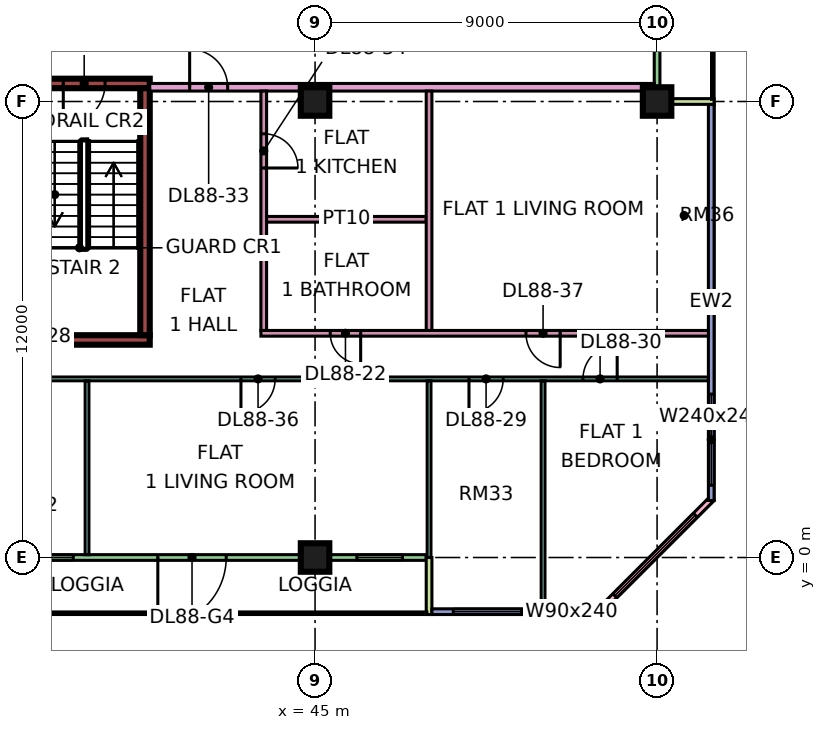
"""IFC4 building model, lengths in metres.
Left out: names, types, materials, properties, quantities, classifications, styles, units other than length and angle.
Written with IfcOpenShell. Run it as: python <this file> out.ifc"""

import sys

from ifc_helpers import new_model, si_unit, direction, frame, frame_2d, origin, origin_2d, place, context, subcontext, project, spatial, rectangle, extrude, element, fill, save


model = new_model("IFC4")
c1 = context("Model", 3, precision=1e-05, world=origin(), true_north=direction((0.0, 1.0)))
c2 = subcontext(c1, "Body", "Model", "MODEL_VIEW")
j1 = project(units=[si_unit("LENGTHUNIT", "METRE"), si_unit("PLANEANGLEUNIT", "RADIAN")], contexts=[c1])
p1 = place(None, origin())
s1 = spatial("IfcSite", under=j1, at=p1, CompositionType="ELEMENT")
p2 = place(p1, origin())
s2 = spatial("IfcBuilding", under=s1, at=p2, CompositionType="ELEMENT")
p3 = place(p2, frame((0.0, 0.0, 376.4)))
s3 = spatial("IfcBuildingStorey", under=s2, at=p3, CompositionType="ELEMENT", Elevation=376.4)
for number, where, z_axis, x_axis in (
    (1, (45.0, 0.0, 0.0), (0.0, 0.0, 1.0), (1.0, 0.0, 0.0)),
    (2, (45.0, 12.0, 0.0), (0.0, 0.0, 1.0), (1.0, 0.0, 0.0)),
    (3, (54.0, 12.0, 0.0), (0.0, 0.0, 1.0), (1.0, 0.0, 0.0)),
):
    element("IfcColumn", number, at=place(p3, frame(where, z_axis=z_axis, x_axis=x_axis)), inside=s3, PredefinedType="COLUMN", context=c2, shape_type="SweptSolid", body=[
        extrude(rectangle(XDim=0.75, YDim=0.75, at=origin_2d()), origin(), (0.0, 0.0, 1.0), 3.75),
    ])
p4 = place(p3, frame((37.2, 5.725, 0.0), z_axis=(0.0, 0.0, 1.0), x_axis=(1.0, 0.0, 0.0)))
e4 = element("IfcWall", 4, at=p4, inside=s3, PredefinedType="SHEAR", context=c2, shape_type="SweptSolid", body=[
    extrude(rectangle(XDim=3.45, YDim=0.25, at=frame_2d((1.725, 0.0))), origin(), (0.0, 0.0, 1.0), 3.75),
])
p5 = place(p3, frame((36.375, 12.475, 0.0), z_axis=(0.0, 0.0, 1.0), x_axis=(1.0, 0.0, 0.0)))
e5 = element("IfcWall", 5, at=p5, inside=s3, PredefinedType="SHEAR", context=c2, shape_type="SweptSolid", body=[
    extrude(rectangle(XDim=4.275, YDim=0.25, at=frame_2d((2.137, 0.0))), origin(), (0.0, 0.0, 1.0), 3.75),
])
p6 = place(p5, frame((2.0, 0.0, 0.0)))
e6 = element("IfcOpeningElement", 6, at=p6, cuts=e5, PredefinedType="OPENING", context=c2, shape_type="SweptSolid", body=[
    extrude(rectangle(XDim=1.1, YDim=2.2, at=frame_2d((0.55, 1.1))), frame((0.0, 0.135, 0.0), z_axis=(0.0, -1.0, 0.0), x_axis=(1.0, 0.0, 0.0)), (0.0, 0.0, 1.0), 0.27),
])
p7 = place(p3, frame((40.525, 5.85, 0.0), z_axis=(0.0, 0.0, 1.0), x_axis=(0.0, 1.0, 0.0)))
e7 = element("IfcWall", 7, at=p7, inside=s3, PredefinedType="SHEAR", context=c2, shape_type="SweptSolid", body=[
    extrude(rectangle(XDim=6.5, YDim=0.25, at=frame_2d((3.25, 0.0))), origin(), (0.0, 0.0, 1.0), 3.75),
])
p8 = place(p3, frame((36.075, 0.0, 0.0), z_axis=(0.0, 0.0, 1.0), x_axis=(1.0, 0.0, 0.0)))
e8 = element("IfcWall", 8, at=p8, inside=s3, PredefinedType="SOLIDWALL", context=c2, shape_type="SweptSolid", body=[
    extrude(rectangle(XDim=11.85, YDim=0.15, at=frame_2d((5.925, 0.0))), origin(), (0.0, 0.0, 1.0), 3.35),
])
p9 = place(p8, frame((0.762, 0.0, 0.45)))
e9 = element("IfcOpeningElement", 9, at=p9, cuts=e8, PredefinedType="OPENING", context=c2, shape_type="SweptSolid", body=[
    extrude(rectangle(XDim=1.8, YDim=2.4, at=frame_2d((0.9, 1.2))), frame((0.0, 0.085, 0.0), z_axis=(0.0, -1.0, 0.0), x_axis=(1.0, 0.0, 0.0)), (0.0, 0.0, 1.0), 0.17),
])
p10 = place(p8, frame((4.788, 0.0, 0.0)))
e10 = element("IfcOpeningElement", 10, at=p10, cuts=e8, PredefinedType="OPENING", context=c2, shape_type="SweptSolid", body=[
    extrude(rectangle(XDim=1.8, YDim=2.4, at=frame_2d((0.9, 1.2))), frame((0.0, 0.085, 0.0), z_axis=(0.0, -1.0, 0.0), x_axis=(1.0, 0.0, 0.0)), (0.0, 0.0, 1.0), 0.17),
])
p11 = place(p8, frame((10.025, 0.0, 0.45)))
e11 = element("IfcOpeningElement", 11, at=p11, cuts=e8, PredefinedType="OPENING", context=c2, shape_type="SweptSolid", body=[
    extrude(rectangle(XDim=1.2, YDim=2.4, at=frame_2d((0.6, 1.2))), frame((0.0, 0.085, 0.0), z_axis=(0.0, -1.0, 0.0), x_axis=(1.0, 0.0, 0.0)), (0.0, 0.0, 1.0), 0.17),
])
p12 = place(p3, frame((48.0, -1.5, 0.0), z_axis=(0.0, 0.0, 1.0), x_axis=(0.0, 1.0, 0.0)))
e12 = element("IfcWall", 12, at=p12, inside=s3, PredefinedType="SOLIDWALL", context=c2, shape_type="SweptSolid", body=[
    extrude(rectangle(XDim=1.5, YDim=0.15, at=frame_2d((0.75, 0.0))), origin(), (0.0, 0.0, 1.0), 3.35),
])
p13 = place(p3, frame((48.075, -1.425, 0.0), z_axis=(0.0, 0.0, 1.0), x_axis=(1.0, 0.0, 0.0)))
e13 = element("IfcWall", 13, at=p13, inside=s3, PredefinedType="SOLIDWALL", context=c2, shape_type="SweptSolid", body=[
    extrude(rectangle(XDim=4.425, YDim=0.15, at=frame_2d((2.212, 0.0))), origin(), (0.0, 0.0, 1.0), 3.35),
])
p14 = place(p13, frame((0.562, 0.0, 0.45)))
e14 = element("IfcOpeningElement", 14, at=p14, cuts=e13, PredefinedType="OPENING", context=c2, shape_type="SweptSolid", body=[
    extrude(rectangle(XDim=1.8, YDim=2.4, at=frame_2d((0.9, 1.2))), frame((0.0, 0.085, 0.0), z_axis=(0.0, -1.0, 0.0), x_axis=(1.0, 0.0, 0.0)), (0.0, 0.0, 1.0), 0.17),
])
p15 = place(p13, frame((3.225, 0.0, 0.45)))
e15 = element("IfcOpeningElement", 15, at=p15, cuts=e13, PredefinedType="OPENING", context=c2, shape_type="SweptSolid", body=[
    extrude(rectangle(XDim=0.9, YDim=2.4, at=frame_2d((0.45, 1.2))), frame((0.0, 0.085, 0.0), z_axis=(0.0, -1.0, 0.0), x_axis=(1.0, 0.0, 0.0)), (0.0, 0.0, 1.0), 0.17),
])
p16 = place(p3, frame((52.447, -1.447, 0.0), z_axis=(0.0, 0.0, 1.0), x_axis=(0.707106781187, 0.707106781187, 0.0)))
e16 = element("IfcWall", 16, at=p16, inside=s3, PredefinedType="SOLIDWALL", context=c2, shape_type="SweptSolid", body=[
    extrude(rectangle(XDim=4.243, YDim=0.15, at=frame_2d((2.121, 0.0))), origin(), (0.0, 0.0, 1.0), 3.35),
])
p17 = place(p16, frame((0.621, 0.0, 0.45)))
e17 = element("IfcOpeningElement", 17, at=p17, cuts=e16, PredefinedType="OPENING", context=c2, shape_type="SweptSolid", body=[
    extrude(rectangle(XDim=3.0, YDim=2.4, at=frame_2d((1.5, 1.2))), frame((0.0, 0.085, 0.0), z_axis=(0.0, -1.0, 0.0), x_axis=(1.0, 0.0, 0.0)), (0.0, 0.0, 1.0), 0.17),
])
p18 = place(p3, frame((55.425, 1.5, 0.0), z_axis=(0.0, 0.0, 1.0), x_axis=(0.0, 1.0, 0.0)))
e18 = element("IfcWall", 18, at=p18, inside=s3, PredefinedType="SOLIDWALL", context=c2, shape_type="SweptSolid", body=[
    extrude(rectangle(XDim=10.425, YDim=0.15, at=frame_2d((5.212, 0.0))), origin(), (0.0, 0.0, 1.0), 3.35),
])
p19 = place(p18, frame((0.4, 0.0, 0.45)))
e19 = element("IfcOpeningElement", 19, at=p19, cuts=e18, PredefinedType="OPENING", context=c2, shape_type="SweptSolid", body=[
    extrude(rectangle(XDim=2.4, YDim=2.4, at=frame_2d((1.2, 1.2))), frame((0.0, 0.085, 0.0), z_axis=(0.0, -1.0, 0.0), x_axis=(1.0, 0.0, 0.0)), (0.0, 0.0, 1.0), 0.17),
])
p20 = place(p3, frame((54.0, 12.075, 0.0), z_axis=(0.0, 0.0, 1.0), x_axis=(0.0, 1.0, 0.0)))
e20 = element("IfcWall", 20, at=p20, inside=s3, PredefinedType="SOLIDWALL", context=c2, shape_type="SweptSolid", body=[
    extrude(rectangle(XDim=10.35, YDim=0.15, at=frame_2d((5.175, 0.0))), origin(), (0.0, 0.0, 1.0), 3.35),
])
p21 = place(p20, frame((4.538, 0.0, 0.45)))
e21 = element("IfcOpeningElement", 21, at=p21, cuts=e20, PredefinedType="OPENING", context=c2, shape_type="SweptSolid", body=[
    extrude(rectangle(XDim=4.8, YDim=2.4, at=frame_2d((2.4, 1.2))), frame((0.0, 0.085, 0.0), z_axis=(0.0, -1.0, 0.0), x_axis=(1.0, 0.0, 0.0)), (0.0, 0.0, 1.0), 0.17),
])
p22 = place(p3, frame((55.5, 12.0, 0.0), z_axis=(0.0, 0.0, 1.0), x_axis=(-1.0, 0.0, 0.0)))
e22 = element("IfcWall", 22, at=p22, inside=s3, PredefinedType="SOLIDWALL", context=c2, shape_type="SweptSolid", body=[
    extrude(rectangle(XDim=1.5, YDim=0.15, at=frame_2d((0.75, 0.0))), origin(), (0.0, 0.0, 1.0), 3.35),
])
p23 = place(p3, frame((33.05, 4.7, 0.0), z_axis=(0.0, 0.0, 1.0), x_axis=(1.0, 0.0, 0.0)))
e23 = element("IfcWall", 23, at=p23, inside=s3, PredefinedType="PARTITIONING", context=c2, shape_type="SweptSolid", body=[
    extrude(rectangle(XDim=22.301, YDim=0.1, at=frame_2d((11.15, 0.0))), origin(), (0.0, 0.0, 1.0), 3.35),
])
p24 = place(p23, frame((1.0, 0.0, 0.0)))
e24 = element("IfcOpeningElement", 24, at=p24, cuts=e23, PredefinedType="OPENING", context=c2, shape_type="SweptSolid", body=[
    extrude(rectangle(XDim=0.9, YDim=2.1, at=frame_2d((0.45, 1.05))), frame((0.0, 0.06, 0.0), z_axis=(0.0, -1.0, 0.0), x_axis=(1.0, 0.0, 0.0)), (0.0, 0.0, 1.0), 0.12),
])
p25 = place(p23, frame((4.0, 0.0, 0.0)))
e25 = element("IfcOpeningElement", 25, at=p25, cuts=e23, PredefinedType="OPENING", context=c2, shape_type="SweptSolid", body=[
    extrude(rectangle(XDim=0.9, YDim=2.1, at=frame_2d((0.45, 1.05))), frame((0.0, 0.06, 0.0), z_axis=(0.0, -1.0, 0.0), x_axis=(1.0, 0.0, 0.0)), (0.0, 0.0, 1.0), 0.12),
])
p26 = place(p23, frame((16.0, 0.0, 0.0)))
e26 = element("IfcOpeningElement", 26, at=p26, cuts=e23, PredefinedType="OPENING", context=c2, shape_type="SweptSolid", body=[
    extrude(rectangle(XDim=0.9, YDim=2.1, at=frame_2d((0.45, 1.05))), frame((0.0, 0.06, 0.0), z_axis=(0.0, -1.0, 0.0), x_axis=(1.0, 0.0, 0.0)), (0.0, 0.0, 1.0), 0.12),
])
p27 = place(p23, frame((19.0, 0.0, 0.0)))
e27 = element("IfcOpeningElement", 27, at=p27, cuts=e23, PredefinedType="OPENING", context=c2, shape_type="SweptSolid", body=[
    extrude(rectangle(XDim=0.9, YDim=2.1, at=frame_2d((0.45, 1.05))), frame((0.0, 0.06, 0.0), z_axis=(0.0, -1.0, 0.0), x_axis=(1.0, 0.0, 0.0)), (0.0, 0.0, 1.0), 0.12),
])
p28 = place(p23, frame((10.0, 0.0, 0.0)))
e28 = element("IfcOpeningElement", 28, at=p28, cuts=e23, PredefinedType="OPENING", context=c2, shape_type="SweptSolid", body=[
    extrude(rectangle(XDim=0.9, YDim=2.1, at=frame_2d((0.45, 1.05))), frame((0.0, 0.06, 0.0), z_axis=(0.0, -1.0, 0.0), x_axis=(1.0, 0.0, 0.0)), (0.0, 0.0, 1.0), 0.12),
])
p29 = place(p3, frame((39.0, 0.074, 0.0), z_axis=(0.0, 0.0, 1.0), x_axis=(0.0, 1.0, 0.0)))
e29 = element("IfcWall", 29, at=p29, inside=s3, PredefinedType="PARTITIONING", context=c2, shape_type="SweptSolid", body=[
    extrude(rectangle(XDim=4.576, YDim=0.1, at=frame_2d((2.288, 0.0))), origin(), (0.0, 0.0, 1.0), 3.35),
])
p30 = place(p3, frame((40.65, 12.375, 0.0), z_axis=(0.0, 0.0, 1.0), x_axis=(1.0, 0.0, 0.0)))
e30 = element("IfcWall", 30, at=p30, inside=s3, PredefinedType="PARTITIONING", context=c2, shape_type="SweptSolid", body=[
    extrude(rectangle(XDim=13.276, YDim=0.2, at=frame_2d((6.638, 0.0))), origin(), (0.0, 0.0, 1.0), 3.35),
])
p31 = place(p30, frame((1.05, 0.0, 0.0)))
e31 = element("IfcOpeningElement", 31, at=p31, cuts=e30, PredefinedType="OPENING", context=c2, shape_type="SweptSolid", body=[
    extrude(rectangle(XDim=1.0, YDim=2.1, at=frame_2d((0.5, 1.05))), frame((0.0, 0.11, 0.0), z_axis=(0.0, -1.0, 0.0), x_axis=(1.0, 0.0, 0.0)), (0.0, 0.0, 1.0), 0.22),
])
p32 = place(p3, frame((43.575, 5.9, 0.0), z_axis=(0.0, 0.0, 1.0), x_axis=(1.0, 0.0, 0.0)))
e32 = element("IfcWall", 32, at=p32, inside=s3, PredefinedType="PARTITIONING", context=c2, shape_type="SweptSolid", body=[
    extrude(rectangle(XDim=11.775, YDim=0.15, at=frame_2d((5.888, 0.0))), origin(), (0.0, 0.0, 1.0), 3.35),
])
p33 = place(p32, frame((1.825, 0.0, 0.0)))
e33 = element("IfcOpeningElement", 33, at=p33, cuts=e32, PredefinedType="OPENING", context=c2, shape_type="SweptSolid", body=[
    extrude(rectangle(XDim=0.8, YDim=2.1, at=frame_2d((0.4, 1.05))), frame((0.0, 0.085, 0.0), z_axis=(0.0, -1.0, 0.0), x_axis=(1.0, 0.0, 0.0)), (0.0, 0.0, 1.0), 0.17),
])
p34 = place(p32, frame((6.975, 0.0, 0.0)))
e34 = element("IfcOpeningElement", 34, at=p34, cuts=e32, PredefinedType="OPENING", context=c2, shape_type="SweptSolid", body=[
    extrude(rectangle(XDim=0.9, YDim=2.1, at=frame_2d((0.45, 1.05))), frame((0.0, 0.085, 0.0), z_axis=(0.0, -1.0, 0.0), x_axis=(1.0, 0.0, 0.0)), (0.0, 0.0, 1.0), 0.17),
])
p35 = place(p3, frame((43.65, 5.975, 0.0), z_axis=(0.0, 0.0, 1.0), x_axis=(0.0, 1.0, 0.0)))
e35 = element("IfcWall", 35, at=p35, inside=s3, PredefinedType="PARTITIONING", context=c2, shape_type="SweptSolid", body=[
    extrude(rectangle(XDim=6.3, YDim=0.15, at=frame_2d((3.15, 0.0))), origin(), (0.0, 0.0, 1.0), 3.35),
])
p36 = place(p35, frame((4.275, 0.0, 0.0)))
e36 = element("IfcOpeningElement", 36, at=p36, cuts=e35, PredefinedType="OPENING", context=c2, shape_type="SweptSolid", body=[
    extrude(rectangle(XDim=0.9, YDim=2.1, at=frame_2d((0.45, 1.05))), frame((0.0, 0.085, 0.0), z_axis=(0.0, -1.0, 0.0), x_axis=(1.0, 0.0, 0.0)), (0.0, 0.0, 1.0), 0.17),
])
p37 = place(p3, frame((43.725, 8.9, 0.0), z_axis=(0.0, 0.0, 1.0), x_axis=(1.0, 0.0, 0.0)))
e37 = element("IfcWall", 37, at=p37, inside=s3, PredefinedType="PARTITIONING", context=c2, shape_type="SweptSolid", body=[
    extrude(rectangle(XDim=4.2, YDim=0.15, at=frame_2d((2.1, 0.0))), origin(), (0.0, 0.0, 1.0), 3.35),
])
p38 = place(p3, frame((48.0, 0.0, 0.0), z_axis=(0.0, 0.0, 1.0), x_axis=(0.0, 1.0, 0.0)))
e38 = element("IfcWall", 38, at=p38, inside=s3, PredefinedType="PARTITIONING", context=c2, shape_type="SweptSolid", body=[
    extrude(rectangle(XDim=4.65, YDim=0.1, at=frame_2d((2.325, 0.0))), origin(), (0.0, 0.0, 1.0), 3.35),
])
p39 = place(p3, frame((48.0, 5.975, 0.0), z_axis=(0.0, 0.0, 1.0), x_axis=(0.0, 1.0, 0.0)))
e39 = element("IfcWall", 39, at=p39, inside=s3, PredefinedType="PARTITIONING", context=c2, shape_type="SweptSolid", body=[
    extrude(rectangle(XDim=6.3, YDim=0.15, at=frame_2d((3.15, 0.0))), origin(), (0.0, 0.0, 1.0), 3.35),
])
p40 = place(p3, frame((51.0, -1.351, 0.0), z_axis=(0.0, 0.0, 1.0), x_axis=(0.0, 1.0, 0.0)))
e40 = element("IfcWall", 40, at=p40, inside=s3, PredefinedType="PARTITIONING", context=c2, shape_type="SweptSolid", body=[
    extrude(rectangle(XDim=6.001, YDim=0.1, at=frame_2d((3.0, 0.0))), origin(), (0.0, 0.0, 1.0), 3.35),
])
p41 = place(p9, origin())
e41 = element("IfcWindow", 41, at=p41, inside=s3, PartitioningType="SINGLE_PANEL", PredefinedType="WINDOW", context=c2, shape_type="SweptSolid", body=[
    extrude(rectangle(XDim=1.8, YDim=2.4, at=frame_2d((0.9, 1.2))), frame((0.0, 0.03, 0.0), z_axis=(0.0, -1.0, 0.0), x_axis=(1.0, 0.0, 0.0)), (0.0, 0.0, 1.0), 0.06),
])
fill(e9, e41)
p42 = place(p10, frame((1.8, 0.0, 0.0), z_axis=(0.0, 0.0, 1.0), x_axis=(-1.0, 0.0, 0.0)))
e42 = element("IfcDoor", 42, at=p42, inside=s3, OperationType="DOUBLE_DOOR_SINGLE_SWING", PredefinedType="DOOR", context=c2, shape_type="SweptSolid", body=[
    extrude(rectangle(XDim=1.8, YDim=2.4, at=frame_2d((0.9, 1.2))), frame((0.0, 0.025, 0.0), z_axis=(0.0, -1.0, 0.0), x_axis=(1.0, 0.0, 0.0)), (0.0, 0.0, 1.0), 0.05),
])
fill(e10, e42)
p43 = place(p11, origin())
e43 = element("IfcWindow", 43, at=p43, inside=s3, PartitioningType="SINGLE_PANEL", PredefinedType="WINDOW", context=c2, shape_type="SweptSolid", body=[
    extrude(rectangle(XDim=1.2, YDim=2.4, at=frame_2d((0.6, 1.2))), frame((0.0, 0.03, 0.0), z_axis=(0.0, -1.0, 0.0), x_axis=(1.0, 0.0, 0.0)), (0.0, 0.0, 1.0), 0.06),
])
fill(e11, e43)
p44 = place(p14, origin())
e44 = element("IfcWindow", 44, at=p44, inside=s3, PartitioningType="SINGLE_PANEL", PredefinedType="WINDOW", context=c2, shape_type="SweptSolid", body=[
    extrude(rectangle(XDim=1.8, YDim=2.4, at=frame_2d((0.9, 1.2))), frame((0.0, 0.03, 0.0), z_axis=(0.0, -1.0, 0.0), x_axis=(1.0, 0.0, 0.0)), (0.0, 0.0, 1.0), 0.06),
])
fill(e14, e44)
p45 = place(p15, origin())
e45 = element("IfcWindow", 45, at=p45, inside=s3, PartitioningType="SINGLE_PANEL", PredefinedType="WINDOW", context=c2, shape_type="SweptSolid", body=[
    extrude(rectangle(XDim=0.9, YDim=2.4, at=frame_2d((0.45, 1.2))), frame((0.0, 0.03, 0.0), z_axis=(0.0, -1.0, 0.0), x_axis=(1.0, 0.0, 0.0)), (0.0, 0.0, 1.0), 0.06),
])
fill(e15, e45)
p46 = place(p17, origin())
e46 = element("IfcWindow", 46, at=p46, inside=s3, PartitioningType="SINGLE_PANEL", PredefinedType="WINDOW", context=c2, shape_type="SweptSolid", body=[
    extrude(rectangle(XDim=3.0, YDim=2.4, at=frame_2d((1.5, 1.2))), frame((0.0, 0.03, 0.0), z_axis=(0.0, -1.0, 0.0), x_axis=(1.0, 0.0, 0.0)), (0.0, 0.0, 1.0), 0.06),
])
fill(e17, e46)
p47 = place(p19, origin())
e47 = element("IfcWindow", 47, at=p47, inside=s3, PartitioningType="SINGLE_PANEL", PredefinedType="WINDOW", context=c2, shape_type="SweptSolid", body=[
    extrude(rectangle(XDim=2.4, YDim=2.4, at=frame_2d((1.2, 1.2))), frame((0.0, 0.03, 0.0), z_axis=(0.0, -1.0, 0.0), x_axis=(1.0, 0.0, 0.0)), (0.0, 0.0, 1.0), 0.06),
])
fill(e19, e47)
p48 = place(p6, frame((1.1, 0.0, 0.0), z_axis=(0.0, 0.0, 1.0), x_axis=(-1.0, 0.0, 0.0)))
e48 = element("IfcDoor", 48, at=p48, inside=s3, OperationType="SINGLE_SWING_LEFT", PredefinedType="DOOR", context=c2, shape_type="SweptSolid", body=[
    extrude(rectangle(XDim=1.1, YDim=2.2, at=frame_2d((0.55, 1.1))), frame((0.0, 0.025, 0.0), z_axis=(0.0, -1.0, 0.0), x_axis=(1.0, 0.0, 0.0)), (0.0, 0.0, 1.0), 0.05),
])
fill(e6, e48)
p49 = place(p33, origin())
e49 = element("IfcDoor", 49, at=p49, inside=s3, OperationType="SINGLE_SWING_RIGHT", PredefinedType="DOOR", context=c2, shape_type="SweptSolid", body=[
    extrude(rectangle(XDim=0.8, YDim=2.1, at=frame_2d((0.4, 1.05))), frame((0.0, 0.025, 0.0), z_axis=(0.0, -1.0, 0.0), x_axis=(1.0, 0.0, 0.0)), (0.0, 0.0, 1.0), 0.05),
])
fill(e33, e49)
p50 = place(p26, frame((0.9, 0.0, 0.0), z_axis=(0.0, 0.0, 1.0), x_axis=(-1.0, 0.0, 0.0)))
e50 = element("IfcDoor", 50, at=p50, inside=s3, OperationType="SINGLE_SWING_LEFT", PredefinedType="DOOR", context=c2, shape_type="SweptSolid", body=[
    extrude(rectangle(XDim=0.9, YDim=2.1, at=frame_2d((0.45, 1.05))), frame((0.0, 0.025, 0.0), z_axis=(0.0, -1.0, 0.0), x_axis=(1.0, 0.0, 0.0)), (0.0, 0.0, 1.0), 0.05),
])
fill(e26, e50)
p51 = place(p27, frame((0.9, 0.0, 0.0), z_axis=(0.0, 0.0, 1.0), x_axis=(-1.0, 0.0, 0.0)))
e51 = element("IfcDoor", 51, at=p51, inside=s3, OperationType="SINGLE_SWING_RIGHT", PredefinedType="DOOR", context=c2, shape_type="SweptSolid", body=[
    extrude(rectangle(XDim=0.9, YDim=2.1, at=frame_2d((0.45, 1.05))), frame((0.0, 0.025, 0.0), z_axis=(0.0, -1.0, 0.0), x_axis=(1.0, 0.0, 0.0)), (0.0, 0.0, 1.0), 0.05),
])
fill(e27, e51)
p52 = place(p31, origin())
e52 = element("IfcDoor", 52, at=p52, inside=s3, OperationType="SINGLE_SWING_LEFT", PredefinedType="DOOR", context=c2, shape_type="SweptSolid", body=[
    extrude(rectangle(XDim=1.0, YDim=2.1, at=frame_2d((0.5, 1.05))), frame((0.0, 0.025, 0.0), z_axis=(0.0, -1.0, 0.0), x_axis=(1.0, 0.0, 0.0)), (0.0, 0.0, 1.0), 0.05),
])
fill(e31, e52)
p53 = place(p36, frame((0.9, 0.0, 0.0), z_axis=(0.0, 0.0, 1.0), x_axis=(-1.0, 0.0, 0.0)))
e53 = element("IfcDoor", 53, at=p53, inside=s3, OperationType="SINGLE_SWING_LEFT", PredefinedType="DOOR", context=c2, shape_type="SweptSolid", body=[
    extrude(rectangle(XDim=0.9, YDim=2.1, at=frame_2d((0.45, 1.05))), frame((0.0, 0.025, 0.0), z_axis=(0.0, -1.0, 0.0), x_axis=(1.0, 0.0, 0.0)), (0.0, 0.0, 1.0), 0.05),
])
fill(e36, e53)
p54 = place(p28, frame((0.9, 0.0, 0.0), z_axis=(0.0, 0.0, 1.0), x_axis=(-1.0, 0.0, 0.0)))
e54 = element("IfcDoor", 54, at=p54, inside=s3, OperationType="SINGLE_SWING_LEFT", PredefinedType="DOOR", context=c2, shape_type="SweptSolid", body=[
    extrude(rectangle(XDim=0.9, YDim=2.1, at=frame_2d((0.45, 1.05))), frame((0.0, 0.025, 0.0), z_axis=(0.0, -1.0, 0.0), x_axis=(1.0, 0.0, 0.0)), (0.0, 0.0, 1.0), 0.05),
])
fill(e28, e54)
p55 = place(p34, origin())
e55 = element("IfcDoor", 55, at=p55, inside=s3, OperationType="SINGLE_SWING_RIGHT", PredefinedType="DOOR", context=c2, shape_type="SweptSolid", body=[
    extrude(rectangle(XDim=0.9, YDim=2.1, at=frame_2d((0.45, 1.05))), frame((0.0, 0.025, 0.0), z_axis=(0.0, -1.0, 0.0), x_axis=(1.0, 0.0, 0.0)), (0.0, 0.0, 1.0), 0.05),
])
fill(e34, e55)
save(model, sys.argv[1])
